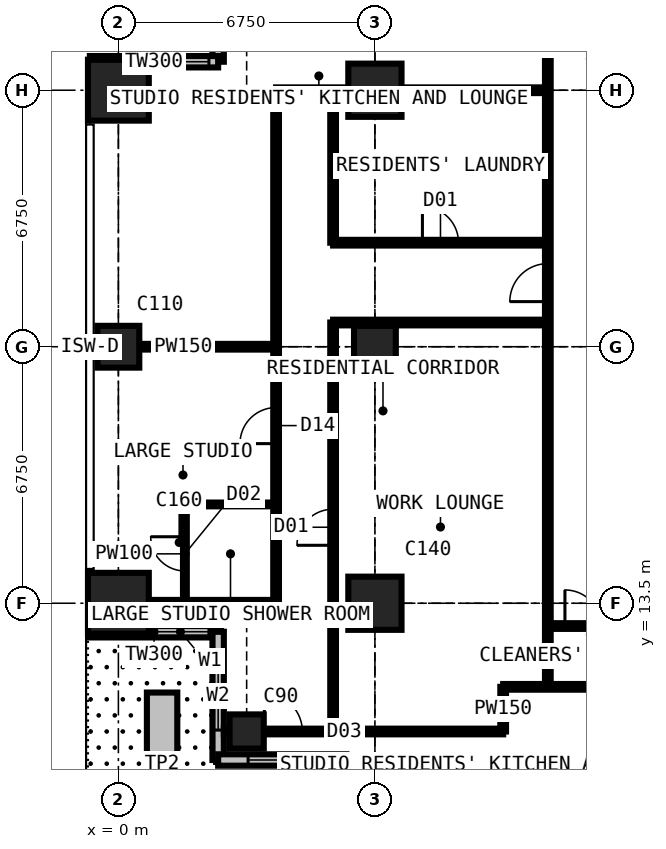
"""IFC4 building model, lengths in metres.
Left out: names, types, materials, properties, quantities, classifications, styles, units other than length and angle.
Written with IfcOpenShell. Run it as: python <this file> out.ifc"""

import sys

from ifc_helpers import new_model, si_unit, direction, frame, frame_2d, origin, origin_2d, place, context, subcontext, project, spatial, rectangle, extrude, element, fill, save


model = new_model("IFC4")
c1 = context("Model", 3, precision=1e-05, world=origin(), true_north=direction((0.0, 1.0)))
c2 = subcontext(c1, "Body", "Model", "MODEL_VIEW")
j1 = project(units=[si_unit("LENGTHUNIT", "METRE"), si_unit("PLANEANGLEUNIT", "RADIAN")], contexts=[c1])
p1 = place(None, origin())
s1 = spatial("IfcSite", under=j1, at=p1, CompositionType="ELEMENT")
p2 = place(p1, origin())
s2 = spatial("IfcBuilding", under=s1, at=p2, CompositionType="ELEMENT")
p3 = place(p2, frame((0.0, 0.0, 204.3)))
s3 = spatial("IfcBuildingStorey", under=s2, at=p3, CompositionType="ELEMENT", Elevation=204.3)
p4 = place(p3, frame((0.0, 13.5, 0.0), z_axis=(0.0, 0.0, 1.0), x_axis=(1.0, 0.0, 0.0)))
e1 = element("IfcColumn", 1, at=p4, inside=s3, PredefinedType="COLUMN", context=c2, shape_type="SweptSolid", body=[
    extrude(rectangle(XDim=1.6, YDim=1.6, at=origin_2d()), origin(), (0.0, 0.0, 1.0), 3.6),
])
p5 = place(p3, frame((0.0, 20.25, 0.0), z_axis=(0.0, 0.0, 1.0), x_axis=(1.0, 0.0, 0.0)))
e2 = element("IfcColumn", 2, at=p5, inside=s3, PredefinedType="COLUMN", context=c2, shape_type="SweptSolid", body=[
    extrude(rectangle(XDim=1.1, YDim=1.1, at=origin_2d()), origin(), (0.0, 0.0, 1.0), 3.6),
])
p6 = place(p3, frame((0.0, 27.0, 0.0), z_axis=(0.0, 0.0, 1.0), x_axis=(1.0, 0.0, 0.0)))
e3 = element("IfcColumn", 3, at=p6, inside=s3, PredefinedType="COLUMN", context=c2, shape_type="SweptSolid", body=[
    extrude(rectangle(XDim=1.6, YDim=1.6, at=origin_2d()), origin(), (0.0, 0.0, 1.0), 3.6),
])
p7 = place(p3, frame((3.375, 10.125, 0.0), z_axis=(0.0, 0.0, 1.0), x_axis=(1.0, 0.0, 0.0)))
e4 = element("IfcColumn", 4, at=p7, inside=s3, PredefinedType="COLUMN", context=c2, shape_type="SweptSolid", body=[
    extrude(rectangle(XDim=0.9, YDim=0.9, at=origin_2d()), origin(), (0.0, 0.0, 1.0), 3.6),
])
p8 = place(p3, frame((6.75, 13.5, 0.0), z_axis=(0.0, 0.0, 1.0), x_axis=(1.0, 0.0, 0.0)))
e5 = element("IfcColumn", 5, at=p8, inside=s3, PredefinedType="COLUMN", context=c2, shape_type="SweptSolid", body=[
    extrude(rectangle(XDim=1.4, YDim=1.4, at=origin_2d()), origin(), (0.0, 0.0, 1.0), 3.6),
])
p9 = place(p3, frame((6.75, 20.25, 0.0), z_axis=(0.0, 0.0, 1.0), x_axis=(1.0, 0.0, 0.0)))
e6 = element("IfcColumn", 6, at=p9, inside=s3, PredefinedType="COLUMN", context=c2, shape_type="SweptSolid", body=[
    extrude(rectangle(XDim=1.1, YDim=1.1, at=origin_2d()), origin(), (0.0, 0.0, 1.0), 3.6),
])
p10 = place(p3, frame((6.75, 27.0, 0.0), z_axis=(0.0, 0.0, 1.0), x_axis=(1.0, 0.0, 0.0)))
e7 = element("IfcColumn", 7, at=p10, inside=s3, PredefinedType="COLUMN", context=c2, shape_type="SweptSolid", body=[
    extrude(rectangle(XDim=1.4, YDim=1.4, at=origin_2d()), origin(), (0.0, 0.0, 1.0), 3.6),
])
p11 = place(p3, frame((2.625, 31.125, 0.0), z_axis=(0.0, 0.0, 1.0), x_axis=(0.0, -1.0, 0.0)))
e8 = element("IfcWall", 8, at=p11, inside=s3, PredefinedType="SOLIDWALL", context=c2, shape_type="SweptSolid", body=[
    extrude(rectangle(XDim=3.375, YDim=0.3, at=frame_2d((1.688, 0.0))), origin(), (0.0, 0.0, 1.0), 3.375),
])
p12 = place(p11, frame((0.788, 0.0, 0.6)))
e9 = element("IfcOpeningElement", 9, at=p12, cuts=e8, PredefinedType="OPENING", context=c2, shape_type="SweptSolid", body=[
    extrude(rectangle(XDim=1.8, YDim=2.1, at=frame_2d((0.9, 1.05))), frame((0.0, 0.16, 0.0), z_axis=(0.0, -1.0, 0.0), x_axis=(1.0, 0.0, 0.0)), (0.0, 0.0, 1.0), 0.32),
])
p13 = place(p3, frame((2.625, 27.75, 0.0), z_axis=(0.0, 0.0, 1.0), x_axis=(-1.0, 0.0, 0.0)))
e10 = element("IfcWall", 10, at=p13, inside=s3, PredefinedType="SOLIDWALL", context=c2, shape_type="SweptSolid", body=[
    extrude(rectangle(XDim=3.375, YDim=0.3, at=frame_2d((1.688, 0.0))), origin(), (0.0, 0.0, 1.0), 3.375),
])
p14 = place(p13, frame((0.242, 0.0, 0.9)))
e11 = element("IfcOpeningElement", 11, at=p14, cuts=e10, PredefinedType="OPENING", context=c2, shape_type="SweptSolid", body=[
    extrude(rectangle(XDim=1.5, YDim=1.8, at=frame_2d((0.75, 0.9))), frame((0.0, 0.16, 0.0), z_axis=(0.0, -1.0, 0.0), x_axis=(1.0, 0.0, 0.0)), (0.0, 0.0, 1.0), 0.32),
])
p15 = place(p3, frame((-0.75, 12.75, 0.0), z_axis=(0.0, 0.0, 1.0), x_axis=(1.0, 0.0, 0.0)))
e12 = element("IfcWall", 12, at=p15, inside=s3, PredefinedType="SOLIDWALL", context=c2, shape_type="SweptSolid", body=[
    extrude(rectangle(XDim=3.375, YDim=0.3, at=frame_2d((1.688, 0.0))), origin(), (0.0, 0.0, 1.0), 3.375),
])
p16 = place(p15, frame((1.633, 0.0, 0.9)))
e13 = element("IfcOpeningElement", 13, at=p16, cuts=e12, PredefinedType="OPENING", context=c2, shape_type="SweptSolid", body=[
    extrude(rectangle(XDim=1.5, YDim=1.8, at=frame_2d((0.75, 0.9))), frame((0.0, 0.16, 0.0), z_axis=(0.0, -1.0, 0.0), x_axis=(1.0, 0.0, 0.0)), (0.0, 0.0, 1.0), 0.32),
])
p17 = place(p3, frame((2.625, 12.75, 0.0), z_axis=(0.0, 0.0, 1.0), x_axis=(0.0, -1.0, 0.0)))
e14 = element("IfcWall", 14, at=p17, inside=s3, PredefinedType="SOLIDWALL", context=c2, shape_type="SweptSolid", body=[
    extrude(rectangle(XDim=3.375, YDim=0.3, at=frame_2d((1.688, 0.0))), origin(), (0.0, 0.0, 1.0), 3.375),
])
p18 = place(p17, frame((0.788, 0.0, 0.6)))
e15 = element("IfcOpeningElement", 15, at=p18, cuts=e14, PredefinedType="OPENING", context=c2, shape_type="SweptSolid", body=[
    extrude(rectangle(XDim=1.8, YDim=2.1, at=frame_2d((0.9, 1.05))), frame((0.0, 0.16, 0.0), z_axis=(0.0, -1.0, 0.0), x_axis=(1.0, 0.0, 0.0)), (0.0, 0.0, 1.0), 0.32),
])
p19 = place(p3, frame((2.625, 9.375, 0.0), z_axis=(0.0, 0.0, 1.0), x_axis=(1.0, 0.0, 0.0)))
e16 = element("IfcWall", 16, at=p19, inside=s3, PredefinedType="SOLIDWALL", context=c2, shape_type="SweptSolid", body=[
    extrude(rectangle(XDim=3.375, YDim=0.3, at=frame_2d((1.688, 0.0))), origin(), (0.0, 0.0, 1.0), 3.375),
])
p20 = place(p19, frame((0.788, 0.0, 0.6)))
e17 = element("IfcOpeningElement", 17, at=p20, cuts=e16, PredefinedType="OPENING", context=c2, shape_type="SweptSolid", body=[
    extrude(rectangle(XDim=1.8, YDim=2.1, at=frame_2d((0.9, 1.05))), frame((0.0, 0.16, 0.0), z_axis=(0.0, -1.0, 0.0), x_axis=(1.0, 0.0, 0.0)), (0.0, 0.0, 1.0), 0.32),
])
p21 = place(p3, frame((6.0, 9.375, 0.0), z_axis=(0.0, 0.0, 1.0), x_axis=(0.0, -1.0, 0.0)))
e18 = element("IfcWall", 18, at=p21, inside=s3, PredefinedType="SOLIDWALL", context=c2, shape_type="SweptSolid", body=[
    extrude(rectangle(XDim=3.375, YDim=0.3, at=frame_2d((1.688, 0.0))), origin(), (0.0, 0.0, 1.0), 3.375),
])
p22 = place(p21, frame((0.788, 0.0, 0.6)))
e19 = element("IfcOpeningElement", 19, at=p22, cuts=e18, PredefinedType="OPENING", context=c2, shape_type="SweptSolid", body=[
    extrude(rectangle(XDim=1.8, YDim=2.1, at=frame_2d((0.9, 1.05))), frame((0.0, 0.16, 0.0), z_axis=(0.0, -1.0, 0.0), x_axis=(1.0, 0.0, 0.0)), (0.0, 0.0, 1.0), 0.32),
])
p23 = place(p3, frame((1.15, 7.4, -0.06), z_axis=(0.0, 0.0, 1.0), x_axis=(0.0, 1.0, 0.0)))
e20 = element("IfcWall", 20, at=p23, inside=s3, PredefinedType="USERDEFINED", context=c2, shape_type="SweptSolid", body=[
    extrude(rectangle(XDim=3.75, YDim=0.8, at=frame_2d((1.875, 0.0))), origin(), (0.0, 0.0, 1.0), 0.66),
])
p24 = place(p3, frame((-0.734, 13.5, 0.0), z_axis=(0.0, 0.0, 1.0), x_axis=(1.0, 0.0, 0.0)))
e21 = element("IfcWall", 21, at=p24, inside=s3, PredefinedType="PARTITIONING", context=c2, shape_type="SweptSolid", body=[
    extrude(rectangle(XDim=4.884, YDim=0.175, at=frame_2d((2.442, 0.0))), origin(), (0.0, 0.0, 1.0), 2.877),
])
p25 = place(p3, frame((-0.734, 20.25, 0.0), z_axis=(0.0, 0.0, 1.0), x_axis=(1.0, 0.0, 0.0)))
e22 = element("IfcWall", 22, at=p25, inside=s3, PredefinedType="PARTITIONING", context=c2, shape_type="SweptSolid", body=[
    extrude(rectangle(XDim=4.884, YDim=0.15, at=frame_2d((2.442, 0.0))), origin(), (0.0, 0.0, 1.0), 2.877),
])
p26 = place(p3, frame((1.75, 13.5, 0.0), z_axis=(0.0, 0.0, 1.0), x_axis=(0.0, 1.0, 0.0)))
e23 = element("IfcWall", 23, at=p26, inside=s3, PredefinedType="PARTITIONING", context=c2, shape_type="SweptSolid", body=[
    extrude(rectangle(XDim=2.6, YDim=0.1, at=frame_2d((1.3, 0.0))), origin(), (0.0, 0.0, 1.0), 3.375),
])
p27 = place(p26, frame((0.85, 0.0, 0.0)))
e24 = element("IfcOpeningElement", 24, at=p27, cuts=e23, PredefinedType="OPENING", context=c2, shape_type="SweptSolid", body=[
    extrude(rectangle(XDim=0.9, YDim=2.2, at=frame_2d((0.45, 1.1))), frame((0.0, 0.06, 0.0), z_axis=(0.0, -1.0, 0.0), x_axis=(1.0, 0.0, 0.0)), (0.0, 0.0, 1.0), 0.12),
])
p28 = place(p3, frame((1.75, 16.1, 0.0), z_axis=(0.0, 0.0, 1.0), x_axis=(1.0, 0.0, 0.0)))
e25 = element("IfcWall", 25, at=p28, inside=s3, PredefinedType="PARTITIONING", context=c2, shape_type="SweptSolid", body=[
    extrude(rectangle(XDim=2.4, YDim=0.1, at=frame_2d((1.2, 0.0))), origin(), (0.0, 0.0, 1.0), 3.375),
])
p29 = place(p3, frame((2.625, 12.766, 0.0), z_axis=(0.0, 0.0, 1.0), x_axis=(0.0, 1.0, 0.0)))
e26 = element("IfcWall", 26, at=p29, inside=s3, PredefinedType="PARTITIONING", context=c2, shape_type="SweptSolid", body=[
    extrude(rectangle(XDim=0.734, YDim=0.15, at=frame_2d((0.367, 0.0))), origin(), (0.0, 0.0, 1.0), 3.375),
])
p30 = place(p3, frame((2.775, 10.125, 0.0), z_axis=(0.0, 0.0, 1.0), x_axis=(1.0, 0.0, 0.0)))
e27 = element("IfcWall", 27, at=p30, inside=s3, PredefinedType="PARTITIONING", context=c2, shape_type="SweptSolid", body=[
    extrude(rectangle(XDim=7.35, YDim=0.15, at=frame_2d((3.675, 0.0))), origin(), (0.0, 0.0, 1.0), 2.877),
])
p31 = place(p30, frame((1.066, 0.0, 0.0)))
e28 = element("IfcOpeningElement", 28, at=p31, cuts=e27, PredefinedType="OPENING", context=c2, shape_type="SweptSolid", body=[
    extrude(rectangle(XDim=1.0, YDim=2.2, at=frame_2d((0.5, 1.1))), frame((0.0, 0.085, 0.0), z_axis=(0.0, -1.0, 0.0), x_axis=(1.0, 0.0, 0.0)), (0.0, 0.0, 1.0), 0.17),
])
p32 = place(p3, frame((4.15, 13.5, 0.0), z_axis=(0.0, 0.0, 1.0), x_axis=(0.0, 1.0, 0.0)))
e29 = element("IfcWall", 29, at=p32, inside=s3, PredefinedType="PARTITIONING", context=c2, shape_type="SweptSolid", body=[
    extrude(rectangle(XDim=13.5, YDim=0.15, at=frame_2d((6.75, 0.0))), origin(), (0.0, 0.0, 1.0), 3.375),
])
p33 = place(p32, frame((4.2, 0.0, 0.0)))
e30 = element("IfcOpeningElement", 30, at=p33, cuts=e29, PredefinedType="OPENING", context=c2, shape_type="SweptSolid", body=[
    extrude(rectangle(XDim=0.95, YDim=2.2, at=frame_2d((0.475, 1.1))), frame((0.0, 0.085, 0.0), z_axis=(0.0, -1.0, 0.0), x_axis=(1.0, 0.0, 0.0)), (0.0, 0.0, 1.0), 0.17),
])
p34 = place(p3, frame((4.15, 27.0, 0.0), z_axis=(0.0, 0.0, 1.0), x_axis=(1.0, 0.0, 0.0)))
e31 = element("IfcWall", 31, at=p34, inside=s3, PredefinedType="PARTITIONING", context=c2, shape_type="SweptSolid", body=[
    extrude(rectangle(XDim=7.15, YDim=0.15, at=frame_2d((3.575, 0.0))), origin(), (0.0, 0.0, 1.0), 2.806),
])
p35 = place(p3, frame((5.65, 10.125, 0.0), z_axis=(0.0, 0.0, 1.0), x_axis=(0.0, 1.0, 0.0)))
e32 = element("IfcWall", 32, at=p35, inside=s3, PredefinedType="PARTITIONING", context=c2, shape_type="SweptSolid", body=[
    extrude(rectangle(XDim=10.762, YDim=0.15, at=frame_2d((5.381, 0.0))), origin(), (0.0, 0.0, 1.0), 3.375),
])
p36 = place(p35, frame((4.9, 0.0, 0.0)))
e33 = element("IfcOpeningElement", 33, at=p36, cuts=e32, PredefinedType="OPENING", context=c2, shape_type="SweptSolid", body=[
    extrude(rectangle(XDim=0.95, YDim=2.2, at=frame_2d((0.475, 1.1))), frame((0.0, 0.085, 0.0), z_axis=(0.0, -1.0, 0.0), x_axis=(1.0, 0.0, 0.0)), (0.0, 0.0, 1.0), 0.17),
])
p37 = place(p3, frame((5.65, 20.887, 0.0), z_axis=(0.0, 0.0, 1.0), x_axis=(1.0, 0.0, 0.0)))
e34 = element("IfcWall", 34, at=p37, inside=s3, PredefinedType="PARTITIONING", context=c2, shape_type="SweptSolid", body=[
    extrude(rectangle(XDim=5.65, YDim=0.15, at=frame_2d((2.825, 0.0))), origin(), (0.0, 0.0, 1.0), 3.375),
])
p38 = place(p3, frame((5.65, 22.988, 0.0), z_axis=(0.0, 0.0, 1.0), x_axis=(0.0, 1.0, 0.0)))
e35 = element("IfcWall", 35, at=p38, inside=s3, PredefinedType="PARTITIONING", context=c2, shape_type="SweptSolid", body=[
    extrude(rectangle(XDim=4.012, YDim=0.15, at=frame_2d((2.006, 0.0))), origin(), (0.0, 0.0, 1.0), 3.375),
])
p39 = place(p3, frame((5.65, 22.988, 0.0), z_axis=(0.0, 0.0, 1.0), x_axis=(1.0, 0.0, 0.0)))
e36 = element("IfcWall", 36, at=p39, inside=s3, PredefinedType="PARTITIONING", context=c2, shape_type="SweptSolid", body=[
    extrude(rectangle(XDim=5.65, YDim=0.15, at=frame_2d((2.825, 0.0))), origin(), (0.0, 0.0, 1.0), 3.375),
])
p40 = place(p39, frame((2.35, 0.0, 0.0)))
e37 = element("IfcOpeningElement", 37, at=p40, cuts=e36, PredefinedType="OPENING", context=c2, shape_type="SweptSolid", body=[
    extrude(rectangle(XDim=0.95, YDim=2.2, at=frame_2d((0.475, 1.1))), frame((0.0, 0.085, 0.0), z_axis=(0.0, -1.0, 0.0), x_axis=(1.0, 0.0, 0.0)), (0.0, 0.0, 1.0), 0.17),
])
p41 = place(p3, frame((10.125, 10.125, 0.0), z_axis=(0.0, 0.0, 1.0), x_axis=(0.0, 1.0, 0.0)))
e38 = element("IfcWall", 38, at=p41, inside=s3, PredefinedType="PARTITIONING", context=c2, shape_type="SweptSolid", body=[
    extrude(rectangle(XDim=1.175, YDim=0.15, at=frame_2d((0.587, 0.0))), origin(), (0.0, 0.0, 1.0), 3.375),
])
p42 = place(p3, frame((10.125, 11.3, 0.0), z_axis=(0.0, 0.0, 1.0), x_axis=(1.0, 0.0, 0.0)))
e39 = element("IfcWall", 39, at=p42, inside=s3, PredefinedType="PARTITIONING", context=c2, shape_type="SweptSolid", body=[
    extrude(rectangle(XDim=20.25, YDim=0.15, at=frame_2d((10.125, 0.0))), origin(), (0.0, 0.0, 1.0), 3.375),
])
p43 = place(p42, frame((11.725, 0.0, 0.0)))
e40 = element("IfcOpeningElement", 40, at=p43, cuts=e39, PredefinedType="OPENING", context=c2, shape_type="SweptSolid", body=[
    extrude(rectangle(XDim=0.95, YDim=2.2, at=frame_2d((0.475, 1.1))), frame((0.0, 0.085, 0.0), z_axis=(0.0, -1.0, 0.0), x_axis=(1.0, 0.0, 0.0)), (0.0, 0.0, 1.0), 0.17),
])
p44 = place(p42, frame((17.475, 0.0, 0.0)))
e41 = element("IfcOpeningElement", 41, at=p44, cuts=e39, PredefinedType="OPENING", context=c2, shape_type="SweptSolid", body=[
    extrude(rectangle(XDim=1.0, YDim=2.2, at=frame_2d((0.5, 1.1))), frame((0.0, 0.085, 0.0), z_axis=(0.0, -1.0, 0.0), x_axis=(1.0, 0.0, 0.0)), (0.0, 0.0, 1.0), 0.17),
])
p45 = place(p42, frame((7.95, 0.0, 0.0)))
e42 = element("IfcOpeningElement", 42, at=p45, cuts=e39, PredefinedType="OPENING", context=c2, shape_type="SweptSolid", body=[
    extrude(rectangle(XDim=0.95, YDim=2.2, at=frame_2d((0.475, 1.1))), frame((0.0, 0.085, 0.0), z_axis=(0.0, -1.0, 0.0), x_axis=(1.0, 0.0, 0.0)), (0.0, 0.0, 1.0), 0.17),
])
p46 = place(p3, frame((11.3, 11.3, 0.0), z_axis=(0.0, 0.0, 1.0), x_axis=(0.0, 1.0, 0.0)))
e43 = element("IfcWall", 43, at=p46, inside=s3, PredefinedType="PARTITIONING", context=c2, shape_type="SweptSolid", body=[
    extrude(rectangle(XDim=19.3, YDim=0.15, at=frame_2d((9.65, 0.0))), origin(), (0.0, 0.0, 1.0), 3.375),
])
p47 = place(p46, frame((18.1, 0.0, 0.0)))
e44 = element("IfcOpeningElement", 44, at=p47, cuts=e43, PredefinedType="OPENING", context=c2, shape_type="SweptSolid", body=[
    extrude(rectangle(XDim=1.0, YDim=2.2, at=frame_2d((0.5, 1.1))), frame((0.0, 0.085, 0.0), z_axis=(0.0, -1.0, 0.0), x_axis=(1.0, 0.0, 0.0)), (0.0, 0.0, 1.0), 0.17),
])
p48 = place(p46, frame((10.137, 0.0, 0.0)))
e45 = element("IfcOpeningElement", 45, at=p48, cuts=e43, PredefinedType="OPENING", context=c2, shape_type="SweptSolid", body=[
    extrude(rectangle(XDim=1.0, YDim=2.2, at=frame_2d((0.5, 1.1))), frame((0.0, 0.085, 0.0), z_axis=(0.0, -1.0, 0.0), x_axis=(1.0, 0.0, 0.0)), (0.0, 0.0, 1.0), 0.17),
])
p49 = place(p3, frame((11.3, 12.9, 0.0), z_axis=(0.0, 0.0, 1.0), x_axis=(1.0, 0.0, 0.0)))
e46 = element("IfcWall", 46, at=p49, inside=s3, PredefinedType="PARTITIONING", context=c2, shape_type="SweptSolid", body=[
    extrude(rectangle(XDim=1.9, YDim=0.15, at=frame_2d((0.95, 0.0))), origin(), (0.0, 0.0, 1.0), 2.806),
])
p50 = place(p49, frame((0.45, 0.0, 0.0)))
e47 = element("IfcOpeningElement", 47, at=p50, cuts=e46, PredefinedType="OPENING", context=c2, shape_type="SweptSolid", body=[
    extrude(rectangle(XDim=0.95, YDim=2.2, at=frame_2d((0.475, 1.1))), frame((0.0, 0.085, 0.0), z_axis=(0.0, -1.0, 0.0), x_axis=(1.0, 0.0, 0.0)), (0.0, 0.0, 1.0), 0.17),
])
p51 = place(p14, origin())
e48 = element("IfcWindow", 48, at=p51, inside=s3, PartitioningType="SINGLE_PANEL", PredefinedType="WINDOW", context=c2, shape_type="SweptSolid", body=[
    extrude(rectangle(XDim=1.5, YDim=1.8, at=frame_2d((0.75, 0.9))), frame((0.0, 0.03, 0.0), z_axis=(0.0, -1.0, 0.0), x_axis=(1.0, 0.0, 0.0)), (0.0, 0.0, 1.0), 0.06),
])
fill(e11, e48)
p52 = place(p16, origin())
e49 = element("IfcWindow", 49, at=p52, inside=s3, PartitioningType="SINGLE_PANEL", PredefinedType="WINDOW", context=c2, shape_type="SweptSolid", body=[
    extrude(rectangle(XDim=1.5, YDim=1.8, at=frame_2d((0.75, 0.9))), frame((0.0, 0.03, 0.0), z_axis=(0.0, -1.0, 0.0), x_axis=(1.0, 0.0, 0.0)), (0.0, 0.0, 1.0), 0.06),
])
fill(e13, e49)
p53 = place(p18, origin())
e50 = element("IfcWindow", 50, at=p53, inside=s3, PartitioningType="SINGLE_PANEL", PredefinedType="WINDOW", context=c2, shape_type="SweptSolid", body=[
    extrude(rectangle(XDim=1.8, YDim=2.1, at=frame_2d((0.9, 1.05))), frame((0.0, 0.03, 0.0), z_axis=(0.0, -1.0, 0.0), x_axis=(1.0, 0.0, 0.0)), (0.0, 0.0, 1.0), 0.06),
])
fill(e15, e50)
p54 = place(p20, origin())
e51 = element("IfcWindow", 51, at=p54, inside=s3, PartitioningType="SINGLE_PANEL", PredefinedType="WINDOW", context=c2, shape_type="SweptSolid", body=[
    extrude(rectangle(XDim=1.8, YDim=2.1, at=frame_2d((0.9, 1.05))), frame((0.0, 0.03, 0.0), z_axis=(0.0, -1.0, 0.0), x_axis=(1.0, 0.0, 0.0)), (0.0, 0.0, 1.0), 0.06),
])
fill(e17, e51)
p55 = place(p50, origin())
e52 = element("IfcDoor", 52, at=p55, inside=s3, OperationType="SINGLE_SWING_LEFT", PredefinedType="DOOR", context=c2, shape_type="SweptSolid", body=[
    extrude(rectangle(XDim=0.95, YDim=2.2, at=frame_2d((0.475, 1.1))), frame((0.0, 0.025, 0.0), z_axis=(0.0, -1.0, 0.0), x_axis=(1.0, 0.0, 0.0)), (0.0, 0.0, 1.0), 0.05),
])
fill(e47, e52)
p56 = place(p31, origin())
e53 = element("IfcDoor", 53, at=p56, inside=s3, OperationType="SINGLE_SWING_LEFT", PredefinedType="DOOR", context=c2, shape_type="SweptSolid", body=[
    extrude(rectangle(XDim=1.0, YDim=2.2, at=frame_2d((0.5, 1.1))), frame((0.0, 0.025, 0.0), z_axis=(0.0, -1.0, 0.0), x_axis=(1.0, 0.0, 0.0)), (0.0, 0.0, 1.0), 0.05),
])
fill(e28, e53)
p57 = place(p33, origin())
e54 = element("IfcDoor", 54, at=p57, inside=s3, OperationType="SINGLE_SWING_LEFT", PredefinedType="DOOR", context=c2, shape_type="SweptSolid", body=[
    extrude(rectangle(XDim=0.95, YDim=2.2, at=frame_2d((0.475, 1.1))), frame((0.0, 0.025, 0.0), z_axis=(0.0, -1.0, 0.0), x_axis=(1.0, 0.0, 0.0)), (0.0, 0.0, 1.0), 0.05),
])
fill(e30, e54)
p58 = place(p27, origin())
e55 = element("IfcDoor", 55, at=p58, inside=s3, OperationType="SINGLE_SWING_RIGHT", PredefinedType="DOOR", context=c2, shape_type="SweptSolid", body=[
    extrude(rectangle(XDim=0.9, YDim=2.2, at=frame_2d((0.45, 1.1))), frame((0.0, 0.025, 0.0), z_axis=(0.0, -1.0, 0.0), x_axis=(1.0, 0.0, 0.0)), (0.0, 0.0, 1.0), 0.05),
])
fill(e24, e55)
p59 = place(p48, origin())
e56 = element("IfcDoor", 56, at=p59, inside=s3, OperationType="SINGLE_SWING_LEFT", PredefinedType="DOOR", context=c2, shape_type="SweptSolid", body=[
    extrude(rectangle(XDim=1.0, YDim=2.2, at=frame_2d((0.5, 1.1))), frame((0.0, 0.025, 0.0), z_axis=(0.0, -1.0, 0.0), x_axis=(1.0, 0.0, 0.0)), (0.0, 0.0, 1.0), 0.05),
])
fill(e45, e56)
p60 = place(p40, origin())
e57 = element("IfcDoor", 57, at=p60, inside=s3, OperationType="SINGLE_SWING_LEFT", PredefinedType="DOOR", context=c2, shape_type="SweptSolid", body=[
    extrude(rectangle(XDim=0.95, YDim=2.2, at=frame_2d((0.475, 1.1))), frame((0.0, 0.025, 0.0), z_axis=(0.0, -1.0, 0.0), x_axis=(1.0, 0.0, 0.0)), (0.0, 0.0, 1.0), 0.05),
])
fill(e37, e57)
p61 = place(p36, origin())
e58 = element("IfcDoor", 58, at=p61, inside=s3, OperationType="SINGLE_SWING_LEFT", PredefinedType="DOOR", context=c2, shape_type="SweptSolid", body=[
    extrude(rectangle(XDim=0.95, YDim=2.2, at=frame_2d((0.475, 1.1))), frame((0.0, 0.025, 0.0), z_axis=(0.0, -1.0, 0.0), x_axis=(1.0, 0.0, 0.0)), (0.0, 0.0, 1.0), 0.05),
])
fill(e33, e58)
save(model, sys.argv[1])
